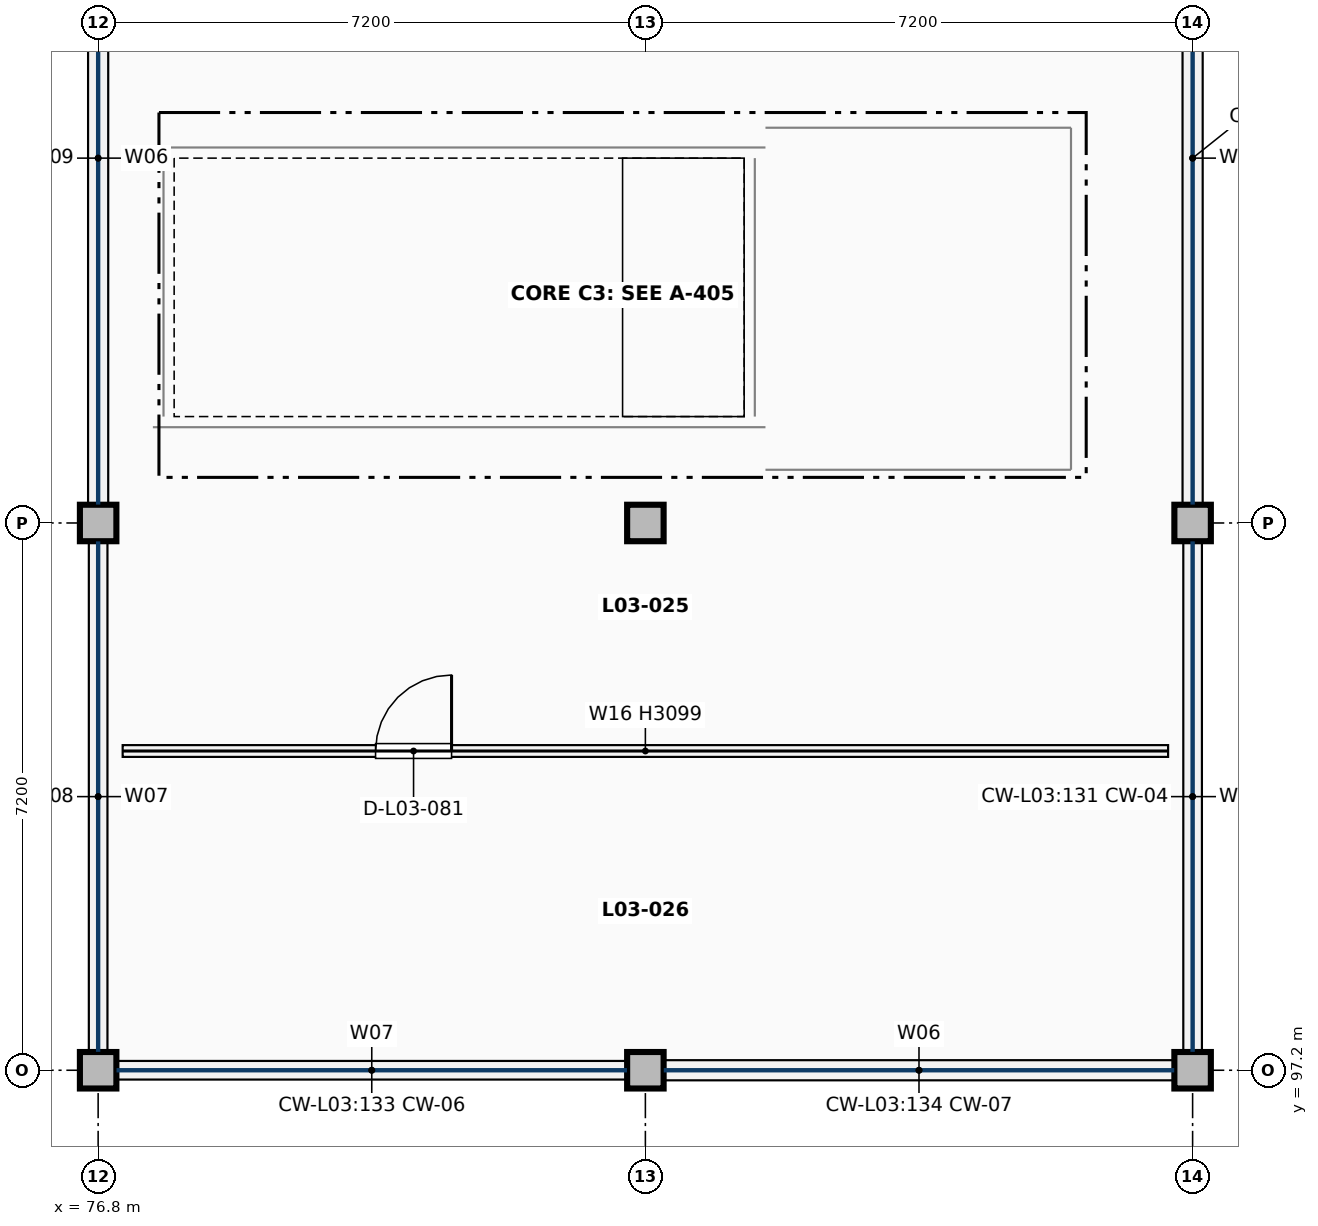
"""IFC4 building model, lengths in metres.
Left out: names, types, materials, properties, quantities, classifications, styles, units other than length and angle.
Written with IfcOpenShell. Run it as: python <this file> out.ifc"""

import sys

from ifc_helpers import new_model, si_unit, direction, frame, frame_2d, origin, origin_2d, place, context, subcontext, project, spatial, rectangle, extrude, element, fill, save


model = new_model("IFC4")
c1 = context("Model", 3, precision=1e-05, world=origin(), true_north=direction((0.0, 1.0)))
c2 = subcontext(c1, "Body", "Model", "MODEL_VIEW")
j1 = project(units=[si_unit("LENGTHUNIT", "METRE"), si_unit("PLANEANGLEUNIT", "RADIAN")], contexts=[c1])
p1 = place(None, origin())
s1 = spatial("IfcSite", under=j1, at=p1, CompositionType="ELEMENT")
p2 = place(p1, origin())
s2 = spatial("IfcBuilding", under=s1, at=p2, CompositionType="ELEMENT")
p3 = place(p2, frame((0.0, 0.0, 13.6)))
s3 = spatial("IfcBuildingStorey", under=s2, at=p3, CompositionType="ELEMENT", Elevation=13.6)
for number, where, z_axis, x_axis in (
    (1, (76.8, 97.2, 0.0), (0.0, 0.0, 1.0), (1.0, 0.0, 0.0)),
    (2, (76.8, 104.4, 0.0), (0.0, 0.0, 1.0), (1.0, 0.0, 0.0)),
    (3, (84.0, 97.2, 0.0), (0.0, 0.0, 1.0), (1.0, 0.0, 0.0)),
    (4, (84.0, 104.4, 0.0), (0.0, 0.0, 1.0), (1.0, 0.0, 0.0)),
    (5, (91.2, 97.2, 0.0), (0.0, 0.0, 1.0), (1.0, 0.0, 0.0)),
    (6, (91.2, 104.4, 0.0), (0.0, 0.0, 1.0), (1.0, 0.0, 0.0)),
):
    element("IfcColumn", number, at=place(p3, frame(where, z_axis=z_axis, x_axis=x_axis)), inside=s3, PredefinedType="COLUMN", context=c2, shape_type="SweptSolid", body=[
        extrude(rectangle(XDim=0.48, YDim=0.48, at=origin_2d()), origin(), (0.0, 0.0, 1.0), 3.74),
    ])
p4 = place(p3, frame((91.2, 97.442, 0.0), z_axis=(0.0, 0.0, 1.0), x_axis=(0.0, 1.0, 0.0)))
e7 = element("IfcWall", 7, at=p4, inside=s3, PredefinedType="SOLIDWALL", context=c2, shape_type="SweptSolid", body=[
    extrude(rectangle(XDim=6.716, YDim=0.245, at=frame_2d((3.358, 0.0))), origin(), (0.0, 0.0, 1.0), 0.85),
])
p5 = place(p3, frame((91.2, 104.642, 0.0), z_axis=(0.0, 0.0, 1.0), x_axis=(0.0, 1.0, 0.0)))
e8 = element("IfcWall", 8, at=p5, inside=s3, PredefinedType="SOLIDWALL", context=c2, shape_type="SweptSolid", body=[
    extrude(rectangle(XDim=9.116, YDim=0.265, at=frame_2d((4.558, 0.0))), origin(), (0.0, 0.0, 1.0), 0.85),
])
p6 = place(p3, frame((77.042, 97.2, 0.0), z_axis=(0.0, 0.0, 1.0), x_axis=(1.0, 0.0, 0.0)))
e9 = element("IfcWall", 9, at=p6, inside=s3, PredefinedType="SOLIDWALL", context=c2, shape_type="SweptSolid", body=[
    extrude(rectangle(XDim=6.716, YDim=0.245, at=frame_2d((3.358, 0.0))), origin(), (0.0, 0.0, 1.0), 0.85),
])
p7 = place(p3, frame((84.242, 97.2, 0.0), z_axis=(0.0, 0.0, 1.0), x_axis=(1.0, 0.0, 0.0)))
e10 = element("IfcWall", 10, at=p7, inside=s3, PredefinedType="SOLIDWALL", context=c2, shape_type="SweptSolid", body=[
    extrude(rectangle(XDim=6.716, YDim=0.265, at=frame_2d((3.358, 0.0))), origin(), (0.0, 0.0, 1.0), 0.85),
])
p8 = place(p3, frame((76.8, 97.442, 0.0), z_axis=(0.0, 0.0, 1.0), x_axis=(0.0, 1.0, 0.0)))
e11 = element("IfcWall", 11, at=p8, inside=s3, PredefinedType="SOLIDWALL", context=c2, shape_type="SweptSolid", body=[
    extrude(rectangle(XDim=6.716, YDim=0.245, at=frame_2d((3.358, 0.0))), origin(), (0.0, 0.0, 1.0), 0.85),
])
p9 = place(p3, frame((76.8, 104.642, 0.0), z_axis=(0.0, 0.0, 1.0), x_axis=(0.0, 1.0, 0.0)))
e12 = element("IfcWall", 12, at=p9, inside=s3, PredefinedType="SOLIDWALL", context=c2, shape_type="SweptSolid", body=[
    extrude(rectangle(XDim=9.116, YDim=0.265, at=frame_2d((4.558, 0.0))), origin(), (0.0, 0.0, 1.0), 0.85),
])
p10 = place(p3, frame((77.66, 105.8, 0.0), z_axis=(0.0, 0.0, 1.0), x_axis=(0.0, 1.0, 0.0)))
e13 = element("IfcWall", 13, at=p10, inside=s3, PredefinedType="SHEAR", context=c2, shape_type="SweptSolid", body=[
    extrude(rectangle(XDim=3.4, YDim=0.28, at=frame_2d((1.7, 0.0))), origin(), (0.0, 0.0, 1.0), 3.74),
])
for number, where, z_axis, x_axis in (
    (14, (77.52, 105.66, 0.0), (0.0, 0.0, 1.0), (1.0, 0.0, 0.0)),
    (15, (77.52, 109.34, 0.0), (0.0, 0.0, 1.0), (1.0, 0.0, 0.0)),
):
    element("IfcWall", number, at=place(p3, frame(where, z_axis=z_axis, x_axis=x_axis)), inside=s3, PredefinedType="SHEAR", context=c2, shape_type="SweptSolid", body=[
        extrude(rectangle(XDim=8.06, YDim=0.28, at=frame_2d((4.03, 0.0))), origin(), (0.0, 0.0, 1.0), 3.74),
    ])
p11 = place(p3, frame((85.44, 105.8, 0.0), z_axis=(0.0, 0.0, 1.0), x_axis=(0.0, 1.0, 0.0)))
e16 = element("IfcWall", 16, at=p11, inside=s3, PredefinedType="SHEAR", context=c2, shape_type="SweptSolid", body=[
    extrude(rectangle(XDim=3.4, YDim=0.28, at=frame_2d((1.7, 0.0))), origin(), (0.0, 0.0, 1.0), 3.74),
])
p12 = place(p11, frame((1.1, 0.0, 0.0)))
e17 = element("IfcOpeningElement", 17, at=p12, cuts=e16, PredefinedType="OPENING", context=c2, shape_type="SweptSolid", body=[
    extrude(rectangle(XDim=1.2, YDim=2.2, at=frame_2d((0.6, 1.1))), frame((0.0, 0.15, 0.0), z_axis=(0.0, -1.0, 0.0), x_axis=(1.0, 0.0, 0.0)), (0.0, 0.0, 1.0), 0.3),
])
p13 = place(p3, frame((89.6, 105.1, 0.0), z_axis=(0.0, 0.0, 1.0), x_axis=(0.0, 1.0, 0.0)))
e18 = element("IfcWall", 18, at=p13, inside=s3, PredefinedType="PARTITIONING", context=c2, shape_type="SweptSolid", body=[
    extrude(rectangle(XDim=4.5, YDim=0.2, at=frame_2d((2.25, 0.0))), origin(), (0.0, 0.0, 1.0), 3.414),
])
p14 = place(p3, frame((85.58, 105.1, 0.0), z_axis=(0.0, 0.0, 1.0), x_axis=(1.0, 0.0, 0.0)))
e19 = element("IfcWall", 19, at=p14, inside=s3, PredefinedType="PARTITIONING", context=c2, shape_type="SweptSolid", body=[
    extrude(rectangle(XDim=4.02, YDim=0.2, at=frame_2d((2.01, 0.0))), origin(), (0.0, 0.0, 1.0), 3.414),
])
p15 = place(p14, frame((1.285, 0.0, 0.0)))
e20 = element("IfcOpeningElement", 20, at=p15, cuts=e19, PredefinedType="OPENING", context=c2, shape_type="SweptSolid", body=[
    extrude(rectangle(XDim=1.45, YDim=2.2, at=frame_2d((0.725, 1.1))), frame((0.0, 0.11, 0.0), z_axis=(0.0, -1.0, 0.0), x_axis=(1.0, 0.0, 0.0)), (0.0, 0.0, 1.0), 0.22),
])
p16 = place(p3, frame((85.58, 109.6, 0.0), z_axis=(0.0, 0.0, 1.0), x_axis=(1.0, 0.0, 0.0)))
e21 = element("IfcWall", 21, at=p16, inside=s3, PredefinedType="PARTITIONING", context=c2, shape_type="SweptSolid", body=[
    extrude(rectangle(XDim=4.02, YDim=0.2, at=frame_2d((2.01, 0.0))), origin(), (0.0, 0.0, 1.0), 3.414),
])
p17 = place(p3, frame((77.123, 101.4, 0.0), z_axis=(0.0, 0.0, 1.0), x_axis=(1.0, 0.0, 0.0)))
e22 = element("IfcWall", 22, at=p17, inside=s3, PredefinedType="PARTITIONING", context=c2, shape_type="SweptSolid", body=[
    extrude(rectangle(XDim=13.755, YDim=0.155, at=frame_2d((6.877, 0.0))), origin(), (0.0, 0.0, 1.0), 3.099),
])
p18 = place(p17, frame((3.327, 0.0, 0.0)))
e23 = element("IfcOpeningElement", 23, at=p18, cuts=e22, PredefinedType="OPENING", context=c2, shape_type="SweptSolid", body=[
    extrude(rectangle(XDim=1.0, YDim=2.1, at=frame_2d((0.5, 1.05))), frame((0.0, 0.087, 0.0), z_axis=(0.0, -1.0, 0.0), x_axis=(1.0, 0.0, 0.0)), (0.0, 0.0, 1.0), 0.175),
])
p19 = place(p12, origin())
e24 = element("IfcDoor", 24, at=p19, inside=s3, OperationType="SINGLE_SWING_LEFT", PredefinedType="DOOR", context=c2, shape_type="SweptSolid", body=[
    extrude(rectangle(XDim=1.2, YDim=2.2, at=frame_2d((0.6, 1.1))), frame((0.0, 0.025, 0.0), z_axis=(0.0, -1.0, 0.0), x_axis=(1.0, 0.0, 0.0)), (0.0, 0.0, 1.0), 0.05),
])
fill(e17, e24)
p20 = place(p15, frame((1.45, 0.0, 0.0), z_axis=(0.0, 0.0, 1.0), x_axis=(-1.0, 0.0, 0.0)))
e25 = element("IfcDoor", 25, at=p20, inside=s3, OperationType="DOUBLE_DOOR_SINGLE_SWING", PredefinedType="DOOR", context=c2, shape_type="SweptSolid", body=[
    extrude(rectangle(XDim=1.45, YDim=2.2, at=frame_2d((0.725, 1.1))), frame((0.0, 0.025, 0.0), z_axis=(0.0, -1.0, 0.0), x_axis=(1.0, 0.0, 0.0)), (0.0, 0.0, 1.0), 0.05),
])
fill(e20, e25)
p21 = place(p18, origin())
e26 = element("IfcDoor", 26, at=p21, inside=s3, OperationType="SINGLE_SWING_RIGHT", PredefinedType="DOOR", context=c2, shape_type="SweptSolid", body=[
    extrude(rectangle(XDim=1.0, YDim=2.1, at=frame_2d((0.5, 1.05))), frame((0.0, 0.025, 0.0), z_axis=(0.0, -1.0, 0.0), x_axis=(1.0, 0.0, 0.0)), (0.0, 0.0, 1.0), 0.05),
])
fill(e23, e26)
save(model, sys.argv[1])
